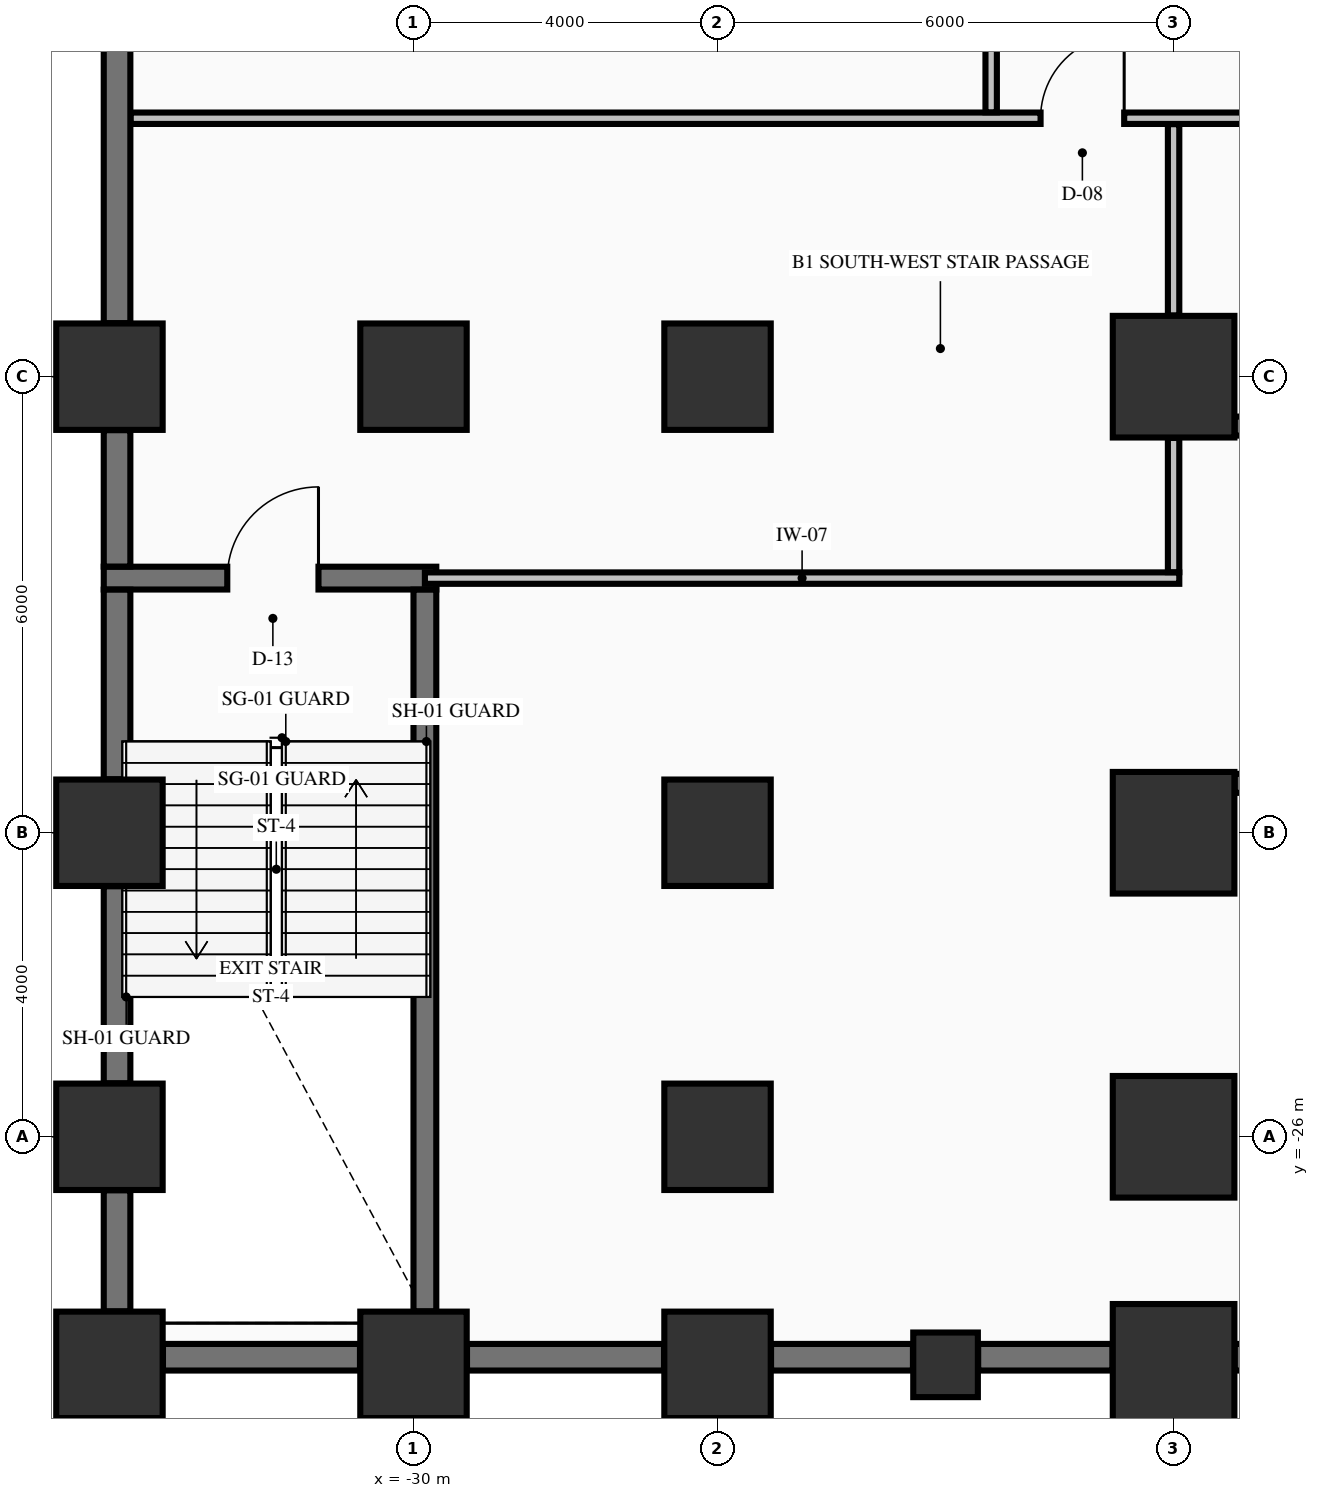
"""IFC4 building model, lengths in metres.
Left out: names, types, materials, properties, quantities, classifications, styles, units other than length and angle.
Written with IfcOpenShell. Run it as: python <this file> out.ifc"""

import sys

from ifc_helpers import new_model, si_unit, direction, frame, frame_2d, origin, origin_2d, place, context, subcontext, project, spatial, rectangle, extrude, element, fill, save


model = new_model("IFC4")
c1 = context("Model", 3, precision=1e-05, world=origin(), true_north=direction((0.0, 1.0)))
c2 = subcontext(c1, "Body", "Model", "MODEL_VIEW")
j1 = project(units=[si_unit("LENGTHUNIT", "METRE"), si_unit("PLANEANGLEUNIT", "RADIAN")], contexts=[c1])
p1 = place(None, origin())
s1 = spatial("IfcSite", under=j1, at=p1, CompositionType="ELEMENT")
p2 = place(p1, origin())
s2 = spatial("IfcBuilding", under=s1, at=p2, CompositionType="ELEMENT")
p3 = place(p2, frame((0.0, 0.0, -4.55)))
s3 = spatial("IfcBuildingStorey", under=s2, at=p3, CompositionType="ELEMENT", Elevation=-4.55)
for number, where, z_axis, x_axis in (
    (1, (-34.0, -29.0, 0.0), (0.0, 0.0, 1.0), (1.0, 0.0, 0.0)),
    (2, (-34.0, -26.0, 0.0), (0.0, 0.0, 1.0), (1.0, 0.0, 0.0)),
    (3, (-34.0, -22.0, 0.0), (0.0, 0.0, 1.0), (1.0, 0.0, 0.0)),
    (4, (-34.0, -16.0, 0.0), (0.0, 0.0, 1.0), (1.0, 0.0, 0.0)),
    (5, (-30.0, -29.0, 0.0), (0.0, 0.0, 1.0), (1.0, 0.0, 0.0)),
    (6, (-30.0, -16.0, 0.0), (0.0, 0.0, 1.0), (1.0, 0.0, 0.0)),
    (7, (-26.0, -29.0, 0.0), (0.0, 0.0, 1.0), (1.0, 0.0, 0.0)),
    (8, (-26.0, -26.0, 0.0), (0.0, 0.0, 1.0), (1.0, 0.0, 0.0)),
    (9, (-26.0, -22.0, 0.0), (0.0, 0.0, 1.0), (1.0, 0.0, 0.0)),
    (10, (-26.0, -16.0, 0.0), (0.0, 0.0, 1.0), (1.0, 0.0, 0.0)),
):
    element("IfcColumn", number, at=place(p3, frame(where, z_axis=z_axis, x_axis=x_axis)), inside=s3, PredefinedType="COLUMN", context=c2, shape_type="SweptSolid", body=[
        extrude(rectangle(XDim=1.4, YDim=1.4, at=origin_2d()), origin(), (0.0, 0.0, 1.0), 4.2),
    ])
for number, where, z_axis, x_axis in (
    (11, (-20.0, -29.0, 0.0), (0.0, 0.0, 1.0), (1.0, 0.0, 0.0)),
    (12, (-20.0, -26.0, 0.0), (0.0, 0.0, 1.0), (1.0, 0.0, 0.0)),
    (13, (-20.0, -22.0, 0.0), (0.0, 0.0, 1.0), (1.0, 0.0, 0.0)),
    (14, (-20.0, -16.0, 0.0), (0.0, 0.0, 1.0), (1.0, 0.0, 0.0)),
):
    element("IfcColumn", number, at=place(p3, frame(where, z_axis=z_axis, x_axis=x_axis)), inside=s3, PredefinedType="COLUMN", context=c2, shape_type="SweptSolid", body=[
        extrude(rectangle(XDim=1.6, YDim=1.6, at=origin_2d()), origin(), (0.0, 0.0, 1.0), 4.2),
    ])
p4 = place(p3, frame((-23.0, -29.0, 0.0), z_axis=(0.0, 0.0, 1.0), x_axis=(1.0, 0.0, 0.0)))
e15 = element("IfcColumn", 15, at=p4, inside=s3, PredefinedType="PILASTER", context=c2, shape_type="SweptSolid", body=[
    extrude(rectangle(XDim=0.85, YDim=0.85, at=origin_2d()), origin(), (0.0, 0.0, 1.0), 4.2),
])
for number, where, z_axis, x_axis in (
    (16, (-33.296, -28.9, 0.0), (0.0, 0.0, 1.0), (1.0, 0.0, 0.0)),
    (17, (-29.296, -28.9, 0.0), (0.0, 0.0, 1.0), (1.0, 0.0, 0.0)),
):
    element("IfcWall", number, at=place(p3, frame(where, z_axis=z_axis, x_axis=x_axis)), inside=s3, PredefinedType="SHEAR", context=c2, shape_type="SweptSolid", body=[
        extrude(rectangle(XDim=2.592, YDim=0.35, at=frame_2d((1.296, 0.0))), origin(), (0.0, 0.0, 1.0), 4.2),
    ])
p5 = place(p3, frame((-25.296, -28.9, 0.0), z_axis=(0.0, 0.0, 1.0), x_axis=(1.0, 0.0, 0.0)))
e18 = element("IfcWall", 18, at=p5, inside=s3, PredefinedType="SHEAR", context=c2, shape_type="SweptSolid", body=[
    extrude(rectangle(XDim=1.867, YDim=0.35, at=frame_2d((0.934, 0.0))), origin(), (0.0, 0.0, 1.0), 4.2),
])
p6 = place(p3, frame((-22.571, -28.9, 0.0), z_axis=(0.0, 0.0, 1.0), x_axis=(1.0, 0.0, 0.0)))
e19 = element("IfcWall", 19, at=p6, inside=s3, PredefinedType="SHEAR", context=c2, shape_type="SweptSolid", body=[
    extrude(rectangle(XDim=1.767, YDim=0.35, at=frame_2d((0.884, 0.0))), origin(), (0.0, 0.0, 1.0), 4.2),
])
p7 = place(p3, frame((-19.196, -28.9, 0.0), z_axis=(0.0, 0.0, 1.0), x_axis=(1.0, 0.0, 0.0)))
e20 = element("IfcWall", 20, at=p7, inside=s3, PredefinedType="SHEAR", context=c2, shape_type="SweptSolid", body=[
    extrude(rectangle(XDim=7.392, YDim=0.35, at=frame_2d((3.696, 0.0))), origin(), (0.0, 0.0, 1.0), 4.2),
])
p8 = place(p3, frame((-19.196, -21.35, 0.0), z_axis=(0.0, 0.0, 1.0), x_axis=(1.0, 0.0, 0.0)))
e21 = element("IfcWall", 21, at=p8, inside=s3, PredefinedType="SOLIDWALL", context=c2, shape_type="SweptSolid", body=[
    extrude(rectangle(XDim=7.392, YDim=0.25, at=frame_2d((3.696, 0.0))), origin(), (0.0, 0.0, 1.0), 4.2),
])
p9 = place(p3, frame((-34.075, -18.65, 0.0), z_axis=(0.0, 0.0, 1.0), x_axis=(1.0, 0.0, 0.0)))
e22 = element("IfcWall", 22, at=p9, inside=s3, PredefinedType="SHEAR", context=c2, shape_type="SweptSolid", body=[
    extrude(rectangle(XDim=4.375, YDim=0.3, at=frame_2d((2.188, 0.0))), origin(), (0.0, 0.0, 1.0), 4.2),
])
p10 = place(p9, frame((1.625, 0.0, 0.0)))
e23 = element("IfcOpeningElement", 23, at=p10, cuts=e22, PredefinedType="OPENING", context=c2, shape_type="SweptSolid", body=[
    extrude(rectangle(XDim=1.2, YDim=2.15, at=frame_2d((0.6, 1.075))), frame((0.0, 0.16, 0.0), z_axis=(0.0, -1.0, 0.0), x_axis=(1.0, 0.0, 0.0)), (0.0, 0.0, 1.0), 0.32),
])
p11 = place(p3, frame((-19.196, -16.65, 0.0), z_axis=(0.0, 0.0, 1.0), x_axis=(1.0, 0.0, 0.0)))
e24 = element("IfcWall", 24, at=p11, inside=s3, PredefinedType="SOLIDWALL", context=c2, shape_type="SweptSolid", body=[
    extrude(rectangle(XDim=7.392, YDim=0.25, at=frame_2d((3.696, 0.0))), origin(), (0.0, 0.0, 1.0), 4.2),
])
p12 = place(p3, frame((-29.85, -18.65, 0.0), z_axis=(0.0, 0.0, 1.0), x_axis=(1.0, 0.0, 0.0)))
e25 = element("IfcWall", 25, at=p12, inside=s3, PredefinedType="PARTITIONING", context=c2, shape_type="SweptSolid", body=[
    extrude(rectangle(XDim=9.925, YDim=0.15, at=frame_2d((4.962, 0.0))), origin(), (0.0, 0.0, 1.0), 4.2),
])
p13 = place(p3, frame((-33.722, -12.6, 0.0), z_axis=(0.0, 0.0, 1.0), x_axis=(1.0, 0.0, 0.0)))
e26 = element("IfcWall", 26, at=p13, inside=s3, PredefinedType="PARTITIONING", context=c2, shape_type="SweptSolid", body=[
    extrude(rectangle(XDim=67.444, YDim=0.15, at=frame_2d((33.722, 0.0))), origin(), (0.0, 0.0, 1.0), 3.74),
])
p14 = place(p13, frame((11.972, 0.0, 0.0)))
e27 = element("IfcOpeningElement", 27, at=p14, cuts=e26, PredefinedType="OPENING", context=c2, shape_type="SweptSolid", body=[
    extrude(rectangle(XDim=1.1, YDim=2.15, at=frame_2d((0.55, 1.075))), frame((0.0, 0.085, 0.0), z_axis=(0.0, -1.0, 0.0), x_axis=(1.0, 0.0, 0.0)), (0.0, 0.0, 1.0), 0.17),
])
p15 = place(p13, frame((54.372, 0.0, 0.0)))
e28 = element("IfcOpeningElement", 28, at=p15, cuts=e26, PredefinedType="OPENING", context=c2, shape_type="SweptSolid", body=[
    extrude(rectangle(XDim=1.1, YDim=2.15, at=frame_2d((0.55, 1.075))), frame((0.0, 0.085, 0.0), z_axis=(0.0, -1.0, 0.0), x_axis=(1.0, 0.0, 0.0)), (0.0, 0.0, 1.0), 0.17),
])
p16 = place(p13, frame((38.622, 0.0, 0.0)))
e29 = element("IfcOpeningElement", 29, at=p16, cuts=e26, PredefinedType="OPENING", context=c2, shape_type="SweptSolid", body=[
    extrude(rectangle(XDim=1.2, YDim=2.15, at=frame_2d((0.6, 1.075))), frame((0.0, 0.085, 0.0), z_axis=(0.0, -1.0, 0.0), x_axis=(1.0, 0.0, 0.0)), (0.0, 0.0, 1.0), 0.17),
])
p17 = place(p3, frame((-33.9, -28.296, 0.0), z_axis=(0.0, 0.0, 1.0), x_axis=(0.0, 1.0, 0.0)))
e30 = element("IfcWall", 30, at=p17, inside=s3, PredefinedType="SHEAR", context=c2, shape_type="SweptSolid", body=[
    extrude(rectangle(XDim=1.592, YDim=0.35, at=frame_2d((0.796, 0.0))), origin(), (0.0, 0.0, 1.0), 4.2),
])
p18 = place(p3, frame((-33.9, -25.296, 0.0), z_axis=(0.0, 0.0, 1.0), x_axis=(0.0, 1.0, 0.0)))
e31 = element("IfcWall", 31, at=p18, inside=s3, PredefinedType="SHEAR", context=c2, shape_type="SweptSolid", body=[
    extrude(rectangle(XDim=2.592, YDim=0.35, at=frame_2d((1.296, 0.0))), origin(), (0.0, 0.0, 1.0), 4.2),
])
p19 = place(p3, frame((-33.9, -21.296, 0.0), z_axis=(0.0, 0.0, 1.0), x_axis=(0.0, 1.0, 0.0)))
e32 = element("IfcWall", 32, at=p19, inside=s3, PredefinedType="SHEAR", context=c2, shape_type="SweptSolid", body=[
    extrude(rectangle(XDim=2.494, YDim=0.35, at=frame_2d((1.247, 0.0))), origin(), (0.0, 0.0, 1.0), 4.2),
])
p20 = place(p3, frame((-33.9, -18.498, 0.0), z_axis=(0.0, 0.0, 1.0), x_axis=(0.0, 1.0, 0.0)))
e33 = element("IfcWall", 33, at=p20, inside=s3, PredefinedType="SHEAR", context=c2, shape_type="SweptSolid", body=[
    extrude(rectangle(XDim=1.794, YDim=0.35, at=frame_2d((0.897, 0.0))), origin(), (0.0, 0.0, 1.0), 4.2),
])
p21 = place(p3, frame((-33.9, -15.296, 0.0), z_axis=(0.0, 0.0, 1.0), x_axis=(0.0, 1.0, 0.0)))
e34 = element("IfcWall", 34, at=p21, inside=s3, PredefinedType="SHEAR", context=c2, shape_type="SweptSolid", body=[
    extrude(rectangle(XDim=5.592, YDim=0.35, at=frame_2d((2.796, 0.0))), origin(), (0.0, 0.0, 1.0), 4.2),
])
p22 = place(p3, frame((-29.85, -28.296, 0.0), z_axis=(0.0, 0.0, 1.0), x_axis=(0.0, 1.0, 0.0)))
e35 = element("IfcWall", 35, at=p22, inside=s3, PredefinedType="SHEAR", context=c2, shape_type="SweptSolid", body=[
    extrude(rectangle(XDim=9.494, YDim=0.3, at=frame_2d((4.747, 0.0))), origin(), (0.0, 0.0, 1.0), 4.2),
])
p23 = place(p3, frame((-22.4, -12.522, 0.0), z_axis=(0.0, 0.0, 1.0), x_axis=(0.0, 1.0, 0.0)))
e36 = element("IfcWall", 36, at=p23, inside=s3, PredefinedType="PARTITIONING", context=c2, shape_type="SweptSolid", body=[
    extrude(rectangle(XDim=2.469, YDim=0.15, at=frame_2d((1.234, 0.0))), origin(), (0.0, 0.0, 1.0), 4.2),
])
p24 = place(p3, frame((-20.0, -18.572, 0.0), z_axis=(0.0, 0.0, 1.0), x_axis=(0.0, 1.0, 0.0)))
e37 = element("IfcWall", 37, at=p24, inside=s3, PredefinedType="PARTITIONING", context=c2, shape_type="SweptSolid", body=[
    extrude(rectangle(XDim=1.766, YDim=0.15, at=frame_2d((0.883, 0.0))), origin(), (0.0, 0.0, 1.0), 3.242),
])
p25 = place(p3, frame((-20.0, -15.194, 0.0), z_axis=(0.0, 0.0, 1.0), x_axis=(0.0, 1.0, 0.0)))
e38 = element("IfcWall", 38, at=p25, inside=s3, PredefinedType="PARTITIONING", context=c2, shape_type="SweptSolid", body=[
    extrude(rectangle(XDim=2.516, YDim=0.15, at=frame_2d((1.258, 0.0))), origin(), (0.0, 0.0, 1.0), 4.2),
])
p26 = place(p10, origin())
e39 = element("IfcDoor", 39, at=p26, inside=s3, OperationType="SINGLE_SWING_RIGHT", PredefinedType="DOOR", context=c2, shape_type="SweptSolid", body=[
    extrude(rectangle(XDim=1.2, YDim=2.15, at=frame_2d((0.6, 1.075))), frame((0.0, 0.025, 0.0), z_axis=(0.0, -1.0, 0.0), x_axis=(1.0, 0.0, 0.0)), (0.0, 0.0, 1.0), 0.05),
])
fill(e23, e39)
p27 = place(p14, origin())
e40 = element("IfcDoor", 40, at=p27, inside=s3, OperationType="SINGLE_SWING_RIGHT", PredefinedType="DOOR", context=c2, shape_type="SweptSolid", body=[
    extrude(rectangle(XDim=1.1, YDim=2.15, at=frame_2d((0.55, 1.075))), frame((0.0, 0.025, 0.0), z_axis=(0.0, -1.0, 0.0), x_axis=(1.0, 0.0, 0.0)), (0.0, 0.0, 1.0), 0.05),
])
fill(e27, e40)
save(model, sys.argv[1])
